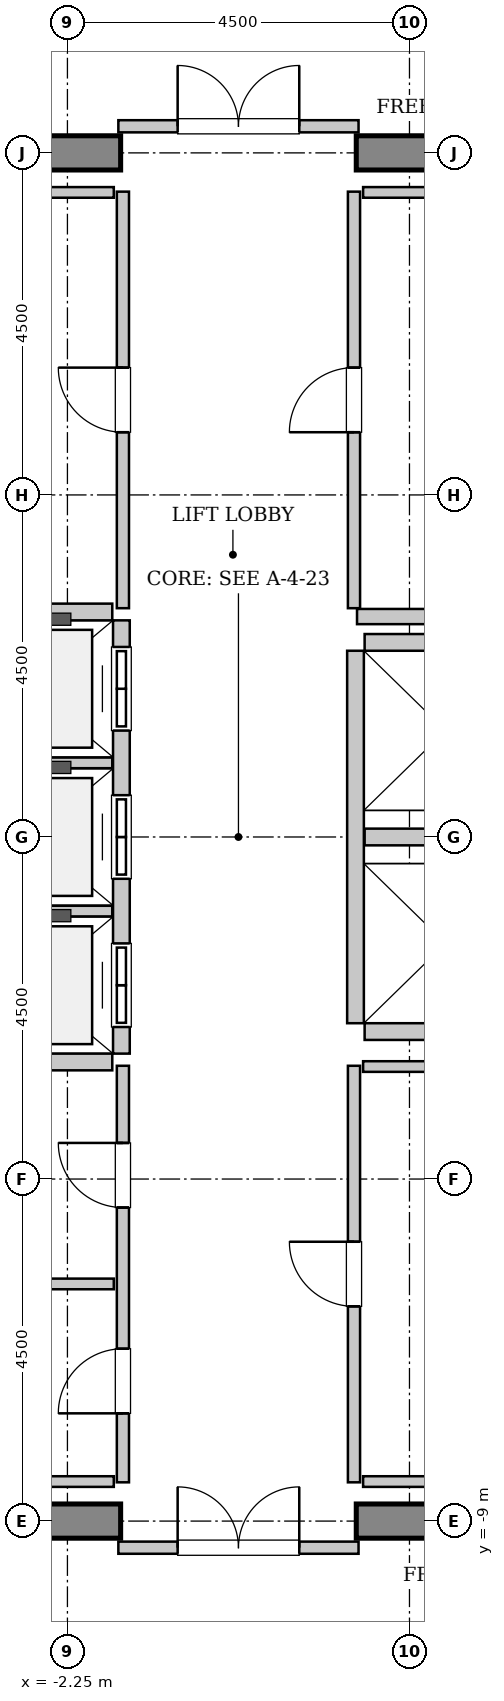
"""IFC4 building model, lengths in metres.
Left out: names, types, materials, properties, quantities, classifications, styles, units other than length and angle.
Written with IfcOpenShell. Run it as: python <this file> out.ifc"""

import sys

from ifc_helpers import new_model, si_unit, direction, frame, frame_2d, origin, place, context, subcontext, project, spatial, rectangle, extrude, source, transform, mapped, element, fill, save


model = new_model("IFC4")
c1 = context("Model", 3, precision=1e-05, world=origin(), true_north=direction((0.0, 1.0)))
c2 = subcontext(c1, "Body", "Model", "MODEL_VIEW")
j1 = project(units=[si_unit("LENGTHUNIT", "METRE"), si_unit("PLANEANGLEUNIT", "RADIAN")], contexts=[c1])
p1 = place(None, origin())
s1 = spatial("IfcSite", under=j1, at=p1, CompositionType="ELEMENT")
p2 = place(p1, origin())
s2 = spatial("IfcBuilding", under=s1, at=p2, CompositionType="ELEMENT")
p3 = place(p2, frame((0.0, 0.0, 287.4)))
s3 = spatial("IfcBuildingStorey", under=s2, at=p3, CompositionType="ELEMENT", Elevation=287.4)
m1 = source(origin(), c2, "Body", "SweptSolid", [
    extrude(rectangle(XDim=9.925, YDim=0.45, at=frame_2d((4.962, 0.0))), origin(), (0.0, 0.0, 1.0), 3.8),
])
for number, where, z_axis, x_axis in (
    (1, (-11.475, 9.0, 0.0), (0.0, 0.0, 1.0), (1.0, 0.0, 0.0)),
    (2, (1.55, 9.0, 0.0), (0.0, 0.0, 1.0), (1.0, 0.0, 0.0)),
    (3, (-11.475, -9.0, 0.0), (0.0, 0.0, 1.0), (1.0, 0.0, 0.0)),
    (4, (1.55, -9.0, 0.0), (0.0, 0.0, 1.0), (1.0, 0.0, 0.0)),
):
    element("IfcWall", number, at=place(p3, frame(where, z_axis=z_axis, x_axis=x_axis)), inside=s3, PredefinedType="SHEAR", context=c2, shape_type="MappedRepresentation", body=[
        mapped(m1, transform((0.0, 0.0, 0.0), x_axis=(1.0, 0.0, 0.0), y_axis=(0.0, 1.0, 0.0), z_axis=(0.0, 0.0, 1.0), scale=1.0)),
    ])
m2 = source(origin(), c2, "Body", "SweptSolid", [
    extrude(rectangle(XDim=5.7, YDim=0.22, at=frame_2d((2.85, 0.0))), origin(), (0.0, 0.0, 1.0), 3.535),
])
p4 = place(p3, frame((-1.54, -2.85, 0.0), z_axis=(0.0, 0.0, 1.0), x_axis=(0.0, 1.0, 0.0)))
e5 = element("IfcWall", 5, at=p4, inside=s3, PredefinedType="SOLIDWALL", context=c2, shape_type="MappedRepresentation", body=[
    mapped(m2, transform((0.0, 0.0, 0.0), x_axis=(1.0, 0.0, 0.0), y_axis=(0.0, 1.0, 0.0), z_axis=(0.0, 0.0, 1.0), scale=1.0)),
])
p5 = place(p4, frame((0.35, 0.0, 0.0)))
e6 = element("IfcOpeningElement", 6, at=p5, cuts=e5, PredefinedType="OPENING", context=c2, shape_type="SweptSolid", body=[
    extrude(rectangle(XDim=1.1, YDim=2.2, at=frame_2d((0.55, 1.1))), frame((0.0, 0.12, 0.0), z_axis=(0.0, -1.0, 0.0), x_axis=(1.0, 0.0, 0.0)), (0.0, 0.0, 1.0), 0.24),
])
p6 = place(p4, frame((2.3, 0.0, 0.0)))
e7 = element("IfcOpeningElement", 7, at=p6, cuts=e5, PredefinedType="OPENING", context=c2, shape_type="SweptSolid", body=[
    extrude(rectangle(XDim=1.1, YDim=2.2, at=frame_2d((0.55, 1.1))), frame((0.0, 0.12, 0.0), z_axis=(0.0, -1.0, 0.0), x_axis=(1.0, 0.0, 0.0)), (0.0, 0.0, 1.0), 0.24),
])
p7 = place(p4, frame((4.25, 0.0, 0.0)))
e8 = element("IfcOpeningElement", 8, at=p7, cuts=e5, PredefinedType="OPENING", context=c2, shape_type="SweptSolid", body=[
    extrude(rectangle(XDim=1.1, YDim=2.2, at=frame_2d((0.55, 1.1))), frame((0.0, 0.12, 0.0), z_axis=(0.0, -1.0, 0.0), x_axis=(1.0, 0.0, 0.0)), (0.0, 0.0, 1.0), 0.24),
])
m3 = source(origin(), c2, "Body", "SweptSolid", [
    extrude(rectangle(XDim=2.13, YDim=0.22, at=frame_2d((1.065, 0.0))), origin(), (0.0, 0.0, 1.0), 3.535),
])
p8 = place(p3, frame((-3.79, -2.96, 0.0), z_axis=(0.0, 0.0, 1.0), x_axis=(1.0, 0.0, 0.0)))
e9 = element("IfcWall", 9, at=p8, inside=s3, PredefinedType="SOLIDWALL", context=c2, shape_type="MappedRepresentation", body=[
    mapped(m3, transform((0.0, 0.0, 0.0), x_axis=(1.0, 0.0, 0.0), y_axis=(0.0, 1.0, 0.0), z_axis=(0.0, 0.0, 1.0), scale=1.0)),
])
m4 = source(origin(), c2, "Body", "SweptSolid", [
    extrude(rectangle(XDim=2.13, YDim=0.14, at=frame_2d((1.065, 0.0))), origin(), (0.0, 0.0, 1.0), 3.535),
])
for number, where, z_axis, x_axis in (
    (10, (-3.79, -0.975, 0.0), (0.0, 0.0, 1.0), (1.0, 0.0, 0.0)),
    (11, (-3.79, 0.975, 0.0), (0.0, 0.0, 1.0), (1.0, 0.0, 0.0)),
):
    element("IfcWall", number, at=place(p3, frame(where, z_axis=z_axis, x_axis=x_axis)), inside=s3, PredefinedType="PARTITIONING", context=c2, shape_type="MappedRepresentation", body=[
        mapped(m4, transform((0.0, 0.0, 0.0), x_axis=(1.0, 0.0, 0.0), y_axis=(0.0, 1.0, 0.0), z_axis=(0.0, 0.0, 1.0), scale=1.0)),
    ])
p9 = place(p3, frame((-1.66, 2.96, 0.0), z_axis=(0.0, 0.0, 1.0), x_axis=(-1.0, 0.0, 0.0)))
e12 = element("IfcWall", 12, at=p9, inside=s3, PredefinedType="SOLIDWALL", context=c2, shape_type="MappedRepresentation", body=[
    mapped(m3, transform((0.0, 0.0, 0.0), x_axis=(1.0, 0.0, 0.0), y_axis=(0.0, 1.0, 0.0), z_axis=(0.0, 0.0, 1.0), scale=1.0)),
])
m5 = source(origin(), c2, "Body", "SweptSolid", [
    extrude(rectangle(XDim=4.9, YDim=0.22, at=frame_2d((2.45, 0.0))), origin(), (0.0, 0.0, 1.0), 3.535),
])
p10 = place(p3, frame((1.54, 2.45, 0.0), z_axis=(0.0, 0.0, 1.0), x_axis=(0.0, -1.0, 0.0)))
e13 = element("IfcWall", 13, at=p10, inside=s3, PredefinedType="SOLIDWALL", context=c2, shape_type="MappedRepresentation", body=[
    mapped(m5, transform((0.0, 0.0, 0.0), x_axis=(1.0, 0.0, 0.0), y_axis=(0.0, 1.0, 0.0), z_axis=(0.0, 0.0, 1.0), scale=1.0)),
])
for number, where, z_axis, x_axis in (
    (14, (1.66, -2.56, 0.0), (0.0, 0.0, 1.0), (1.0, 0.0, 0.0)),
    (15, (1.66, 0.0, 0.0), (0.0, 0.0, 1.0), (1.0, 0.0, 0.0)),
    (16, (3.79, 2.56, 0.0), (0.0, 0.0, 1.0), (-1.0, 0.0, 0.0)),
):
    element("IfcWall", number, at=place(p3, frame(where, z_axis=z_axis, x_axis=x_axis)), inside=s3, PredefinedType="SOLIDWALL", context=c2, shape_type="MappedRepresentation", body=[
        mapped(m3, transform((0.0, 0.0, 0.0), x_axis=(1.0, 0.0, 0.0), y_axis=(0.0, 1.0, 0.0), z_axis=(0.0, 0.0, 1.0), scale=1.0)),
    ])
m6 = source(origin(), c2, "Body", "SweptSolid", [
    extrude(rectangle(XDim=2.52, YDim=0.2, at=frame_2d((1.26, 0.0))), origin(), (0.0, 0.0, 1.0), 3.535),
])
p11 = place(p3, frame((1.56, 2.9, 0.0), z_axis=(0.0, 0.0, 1.0), x_axis=(1.0, 0.0, 0.0)))
e17 = element("IfcWall", 17, at=p11, inside=s3, PredefinedType="PARTITIONING", context=c2, shape_type="MappedRepresentation", body=[
    mapped(m6, transform((0.0, 0.0, 0.0), x_axis=(1.0, 0.0, 0.0), y_axis=(0.0, 1.0, 0.0), z_axis=(0.0, 0.0, 1.0), scale=1.0)),
])
m7 = source(origin(), c2, "Body", "SweptSolid", [
    extrude(rectangle(XDim=3.16, YDim=0.16, at=frame_2d((1.58, 0.0))), origin(), (0.0, 0.0, 1.0), 2.625),
])
p12 = place(p3, frame((-1.58, 9.35, 0.0), z_axis=(0.0, 0.0, 1.0), x_axis=(1.0, 0.0, 0.0)))
e18 = element("IfcWall", 18, at=p12, inside=s3, PredefinedType="PARTITIONING", context=c2, shape_type="MappedRepresentation", body=[
    mapped(m7, transform((0.0, 0.0, 0.0), x_axis=(1.0, 0.0, 0.0), y_axis=(0.0, 1.0, 0.0), z_axis=(0.0, 0.0, 1.0), scale=1.0)),
])
p13 = place(p12, frame((0.78, 0.0, 0.0)))
e19 = element("IfcOpeningElement", 19, at=p13, cuts=e18, PredefinedType="OPENING", context=c2, shape_type="SweptSolid", body=[
    extrude(rectangle(XDim=1.6, YDim=2.3, at=frame_2d((0.8, 1.15))), frame((0.0, 0.09, 0.0), z_axis=(0.0, -1.0, 0.0), x_axis=(1.0, 0.0, 0.0)), (0.0, 0.0, 1.0), 0.18),
])
p14 = place(p3, frame((-1.58, -9.35, 0.0), z_axis=(0.0, 0.0, 1.0), x_axis=(1.0, 0.0, 0.0)))
e20 = element("IfcWall", 20, at=p14, inside=s3, PredefinedType="PARTITIONING", context=c2, shape_type="MappedRepresentation", body=[
    mapped(m7, transform((0.0, 0.0, 0.0), x_axis=(1.0, 0.0, 0.0), y_axis=(0.0, 1.0, 0.0), z_axis=(0.0, 0.0, 1.0), scale=1.0)),
])
p15 = place(p14, frame((0.78, 0.0, 0.0)))
e21 = element("IfcOpeningElement", 21, at=p15, cuts=e20, PredefinedType="OPENING", context=c2, shape_type="SweptSolid", body=[
    extrude(rectangle(XDim=1.6, YDim=2.3, at=frame_2d((0.8, 1.15))), frame((0.0, 0.09, 0.0), z_axis=(0.0, -1.0, 0.0), x_axis=(1.0, 0.0, 0.0)), (0.0, 0.0, 1.0), 0.18),
])
m8 = source(origin(), c2, "Body", "SweptSolid", [
    extrude(rectangle(XDim=5.48, YDim=0.16, at=frame_2d((2.74, 0.0))), origin(), (0.0, 0.0, 1.0), 3.535),
])
p16 = place(p3, frame((-1.52, 3.01, 0.0), z_axis=(0.0, 0.0, 1.0), x_axis=(0.0, 1.0, 0.0)))
e22 = element("IfcWall", 22, at=p16, inside=s3, PredefinedType="PARTITIONING", context=c2, shape_type="MappedRepresentation", body=[
    mapped(m8, transform((0.0, 0.0, 0.0), x_axis=(1.0, 0.0, 0.0), y_axis=(0.0, 1.0, 0.0), z_axis=(0.0, 0.0, 1.0), scale=1.0)),
])
p17 = place(p16, frame((2.315, 0.0, 0.0)))
e23 = element("IfcOpeningElement", 23, at=p17, cuts=e22, PredefinedType="OPENING", context=c2, shape_type="SweptSolid", body=[
    extrude(rectangle(XDim=0.85, YDim=2.1, at=frame_2d((0.425, 1.05))), frame((0.0, 0.09, 0.0), z_axis=(0.0, -1.0, 0.0), x_axis=(1.0, 0.0, 0.0)), (0.0, 0.0, 1.0), 0.18),
])
m9 = source(origin(), c2, "Body", "SweptSolid", [
    extrude(rectangle(XDim=3.15, YDim=0.14, at=frame_2d((1.575, 0.0))), origin(), (0.0, 0.0, 1.0), 3.535),
])
p18 = place(p3, frame((-4.79, 8.48, 0.0), z_axis=(0.0, 0.0, 1.0), x_axis=(1.0, 0.0, 0.0)))
e24 = element("IfcWall", 24, at=p18, inside=s3, PredefinedType="PARTITIONING", context=c2, shape_type="MappedRepresentation", body=[
    mapped(m9, transform((0.0, 0.0, 0.0), x_axis=(1.0, 0.0, 0.0), y_axis=(0.0, 1.0, 0.0), z_axis=(0.0, 0.0, 1.0), scale=1.0)),
])
p19 = place(p3, frame((-1.52, -8.49, 0.0), z_axis=(0.0, 0.0, 1.0), x_axis=(0.0, 1.0, 0.0)))
e25 = element("IfcWall", 25, at=p19, inside=s3, PredefinedType="PARTITIONING", context=c2, shape_type="MappedRepresentation", body=[
    mapped(m8, transform((0.0, 0.0, 0.0), x_axis=(1.0, 0.0, 0.0), y_axis=(0.0, 1.0, 0.0), z_axis=(0.0, 0.0, 1.0), scale=1.0)),
])
p20 = place(p19, frame((0.907, 0.0, 0.0)))
e26 = element("IfcOpeningElement", 26, at=p20, cuts=e25, PredefinedType="OPENING", context=c2, shape_type="SweptSolid", body=[
    extrude(rectangle(XDim=0.85, YDim=2.1, at=frame_2d((0.425, 1.05))), frame((0.0, 0.09, 0.0), z_axis=(0.0, -1.0, 0.0), x_axis=(1.0, 0.0, 0.0)), (0.0, 0.0, 1.0), 0.18),
])
p21 = place(p19, frame((3.615, 0.0, 0.0)))
e27 = element("IfcOpeningElement", 27, at=p21, cuts=e25, PredefinedType="OPENING", context=c2, shape_type="SweptSolid", body=[
    extrude(rectangle(XDim=0.85, YDim=2.1, at=frame_2d((0.425, 1.05))), frame((0.0, 0.09, 0.0), z_axis=(0.0, -1.0, 0.0), x_axis=(1.0, 0.0, 0.0)), (0.0, 0.0, 1.0), 0.18),
])
m10 = source(origin(), c2, "Body", "SweptSolid", [
    extrude(rectangle(XDim=5.55, YDim=0.14, at=frame_2d((2.775, 0.0))), origin(), (0.0, 0.0, 1.0), 3.535),
])
p22 = place(p3, frame((-7.19, -5.88, 0.0), z_axis=(0.0, 0.0, 1.0), x_axis=(1.0, 0.0, 0.0)))
e28 = element("IfcWall", 28, at=p22, inside=s3, PredefinedType="PARTITIONING", context=c2, shape_type="MappedRepresentation", body=[
    mapped(m10, transform((0.0, 0.0, 0.0), x_axis=(1.0, 0.0, 0.0), y_axis=(0.0, 1.0, 0.0), z_axis=(0.0, 0.0, 1.0), scale=1.0)),
])
p23 = place(p3, frame((1.52, 3.01, 0.0), z_axis=(0.0, 0.0, 1.0), x_axis=(0.0, 1.0, 0.0)))
e29 = element("IfcWall", 29, at=p23, inside=s3, PredefinedType="PARTITIONING", context=c2, shape_type="MappedRepresentation", body=[
    mapped(m8, transform((0.0, 0.0, 0.0), x_axis=(1.0, 0.0, 0.0), y_axis=(0.0, 1.0, 0.0), z_axis=(0.0, 0.0, 1.0), scale=1.0)),
])
p24 = place(p23, frame((2.315, 0.0, 0.0)))
e30 = element("IfcOpeningElement", 30, at=p24, cuts=e29, PredefinedType="OPENING", context=c2, shape_type="SweptSolid", body=[
    extrude(rectangle(XDim=0.85, YDim=2.1, at=frame_2d((0.425, 1.05))), frame((0.0, 0.09, 0.0), z_axis=(0.0, -1.0, 0.0), x_axis=(1.0, 0.0, 0.0)), (0.0, 0.0, 1.0), 0.18),
])
for number, where, z_axis, x_axis in (
    (31, (1.64, 8.48, 0.0), (0.0, 0.0, 1.0), (1.0, 0.0, 0.0)),
    (32, (-4.79, -8.48, 0.0), (0.0, 0.0, 1.0), (1.0, 0.0, 0.0)),
):
    element("IfcWall", number, at=place(p3, frame(where, z_axis=z_axis, x_axis=x_axis)), inside=s3, PredefinedType="PARTITIONING", context=c2, shape_type="MappedRepresentation", body=[
        mapped(m9, transform((0.0, 0.0, 0.0), x_axis=(1.0, 0.0, 0.0), y_axis=(0.0, 1.0, 0.0), z_axis=(0.0, 0.0, 1.0), scale=1.0)),
    ])
p25 = place(p3, frame((1.52, -8.49, 0.0), z_axis=(0.0, 0.0, 1.0), x_axis=(0.0, 1.0, 0.0)))
e33 = element("IfcWall", 33, at=p25, inside=s3, PredefinedType="PARTITIONING", context=c2, shape_type="MappedRepresentation", body=[
    mapped(m8, transform((0.0, 0.0, 0.0), x_axis=(1.0, 0.0, 0.0), y_axis=(0.0, 1.0, 0.0), z_axis=(0.0, 0.0, 1.0), scale=1.0)),
])
p26 = place(p25, frame((2.315, 0.0, 0.0)))
e34 = element("IfcOpeningElement", 34, at=p26, cuts=e33, PredefinedType="OPENING", context=c2, shape_type="SweptSolid", body=[
    extrude(rectangle(XDim=0.85, YDim=2.1, at=frame_2d((0.425, 1.05))), frame((0.0, 0.09, 0.0), z_axis=(0.0, -1.0, 0.0), x_axis=(1.0, 0.0, 0.0)), (0.0, 0.0, 1.0), 0.18),
])
for number, where, z_axis, x_axis in (
    (35, (1.64, -3.02, 0.0), (0.0, 0.0, 1.0), (1.0, 0.0, 0.0)),
    (36, (1.64, -8.48, 0.0), (0.0, 0.0, 1.0), (1.0, 0.0, 0.0)),
):
    element("IfcWall", number, at=place(p3, frame(where, z_axis=z_axis, x_axis=x_axis)), inside=s3, PredefinedType="PARTITIONING", context=c2, shape_type="MappedRepresentation", body=[
        mapped(m9, transform((0.0, 0.0, 0.0), x_axis=(1.0, 0.0, 0.0), y_axis=(0.0, 1.0, 0.0), z_axis=(0.0, 0.0, 1.0), scale=1.0)),
    ])
m11 = source(origin(), c2, "Body", "SweptSolid", [
    extrude(rectangle(XDim=1.1, YDim=2.2, at=frame_2d((0.55, 1.1))), frame((0.0, 0.025, 0.0), z_axis=(0.0, -1.0, 0.0), x_axis=(1.0, 0.0, 0.0)), (0.0, 0.0, 1.0), 0.05),
])
p27 = place(p5, origin())
e37 = element("IfcDoor", 37, at=p27, inside=s3, OperationType="DOUBLE_DOOR_SLIDING", PredefinedType="DOOR", context=c2, shape_type="MappedRepresentation", body=[
    mapped(m11, transform((0.0, 0.0, 0.0), x_axis=(1.0, 0.0, 0.0), y_axis=(0.0, 1.0, 0.0), z_axis=(0.0, 0.0, 1.0), scale=1.0)),
])
fill(e6, e37)
p28 = place(p6, origin())
e38 = element("IfcDoor", 38, at=p28, inside=s3, OperationType="DOUBLE_DOOR_SLIDING", PredefinedType="DOOR", context=c2, shape_type="MappedRepresentation", body=[
    mapped(m11, transform((0.0, 0.0, 0.0), x_axis=(1.0, 0.0, 0.0), y_axis=(0.0, 1.0, 0.0), z_axis=(0.0, 0.0, 1.0), scale=1.0)),
])
fill(e7, e38)
p29 = place(p7, origin())
e39 = element("IfcDoor", 39, at=p29, inside=s3, OperationType="DOUBLE_DOOR_SLIDING", PredefinedType="DOOR", context=c2, shape_type="MappedRepresentation", body=[
    mapped(m11, transform((0.0, 0.0, 0.0), x_axis=(1.0, 0.0, 0.0), y_axis=(0.0, 1.0, 0.0), z_axis=(0.0, 0.0, 1.0), scale=1.0)),
])
fill(e8, e39)
m12 = source(origin(), c2, "Body", "SweptSolid", [
    extrude(rectangle(XDim=1.6, YDim=2.3, at=frame_2d((0.8, 1.15))), frame((0.0, 0.025, 0.0), z_axis=(0.0, -1.0, 0.0), x_axis=(1.0, 0.0, 0.0)), (0.0, 0.0, 1.0), 0.05),
])
p30 = place(p13, origin())
e40 = element("IfcDoor", 40, at=p30, inside=s3, OperationType="DOUBLE_DOOR_SINGLE_SWING", PredefinedType="DOOR", context=c2, shape_type="MappedRepresentation", body=[
    mapped(m12, transform((0.0, 0.0, 0.0), x_axis=(1.0, 0.0, 0.0), y_axis=(0.0, 1.0, 0.0), z_axis=(0.0, 0.0, 1.0), scale=1.0)),
])
fill(e19, e40)
p31 = place(p15, origin())
e41 = element("IfcDoor", 41, at=p31, inside=s3, OperationType="DOUBLE_DOOR_SINGLE_SWING", PredefinedType="DOOR", context=c2, shape_type="MappedRepresentation", body=[
    mapped(m12, transform((0.0, 0.0, 0.0), x_axis=(1.0, 0.0, 0.0), y_axis=(0.0, 1.0, 0.0), z_axis=(0.0, 0.0, 1.0), scale=1.0)),
])
fill(e21, e41)
m13 = source(origin(), c2, "Body", "SweptSolid", [
    extrude(rectangle(XDim=0.85, YDim=2.1, at=frame_2d((0.425, 1.05))), frame((0.0, 0.025, 0.0), z_axis=(0.0, -1.0, 0.0), x_axis=(1.0, 0.0, 0.0)), (0.0, 0.0, 1.0), 0.05),
])
p32 = place(p17, origin())
e42 = element("IfcDoor", 42, at=p32, inside=s3, OperationType="SINGLE_SWING_RIGHT", PredefinedType="DOOR", context=c2, shape_type="MappedRepresentation", body=[
    mapped(m13, transform((0.0, 0.0, 0.0), x_axis=(1.0, 0.0, 0.0), y_axis=(0.0, 1.0, 0.0), z_axis=(0.0, 0.0, 1.0), scale=1.0)),
])
fill(e23, e42)
p33 = place(p20, origin())
e43 = element("IfcDoor", 43, at=p33, inside=s3, OperationType="SINGLE_SWING_LEFT", PredefinedType="DOOR", context=c2, shape_type="MappedRepresentation", body=[
    mapped(m13, transform((0.0, 0.0, 0.0), x_axis=(1.0, 0.0, 0.0), y_axis=(0.0, 1.0, 0.0), z_axis=(0.0, 0.0, 1.0), scale=1.0)),
])
fill(e26, e43)
p34 = place(p21, origin())
e44 = element("IfcDoor", 44, at=p34, inside=s3, OperationType="SINGLE_SWING_RIGHT", PredefinedType="DOOR", context=c2, shape_type="MappedRepresentation", body=[
    mapped(m13, transform((0.0, 0.0, 0.0), x_axis=(1.0, 0.0, 0.0), y_axis=(0.0, 1.0, 0.0), z_axis=(0.0, 0.0, 1.0), scale=1.0)),
])
fill(e27, e44)
p35 = place(p24, origin())
e45 = element("IfcDoor", 45, at=p35, inside=s3, OperationType="SINGLE_SWING_LEFT", PredefinedType="DOOR", context=c2, shape_type="MappedRepresentation", body=[
    mapped(m13, transform((0.0, 0.0, 0.0), x_axis=(1.0, 0.0, 0.0), y_axis=(0.0, 1.0, 0.0), z_axis=(0.0, 0.0, 1.0), scale=1.0)),
])
fill(e30, e45)
p36 = place(p26, origin())
e46 = element("IfcDoor", 46, at=p36, inside=s3, OperationType="SINGLE_SWING_RIGHT", PredefinedType="DOOR", context=c2, shape_type="MappedRepresentation", body=[
    mapped(m13, transform((0.0, 0.0, 0.0), x_axis=(1.0, 0.0, 0.0), y_axis=(0.0, 1.0, 0.0), z_axis=(0.0, 0.0, 1.0), scale=1.0)),
])
fill(e34, e46)
save(model, sys.argv[1])
